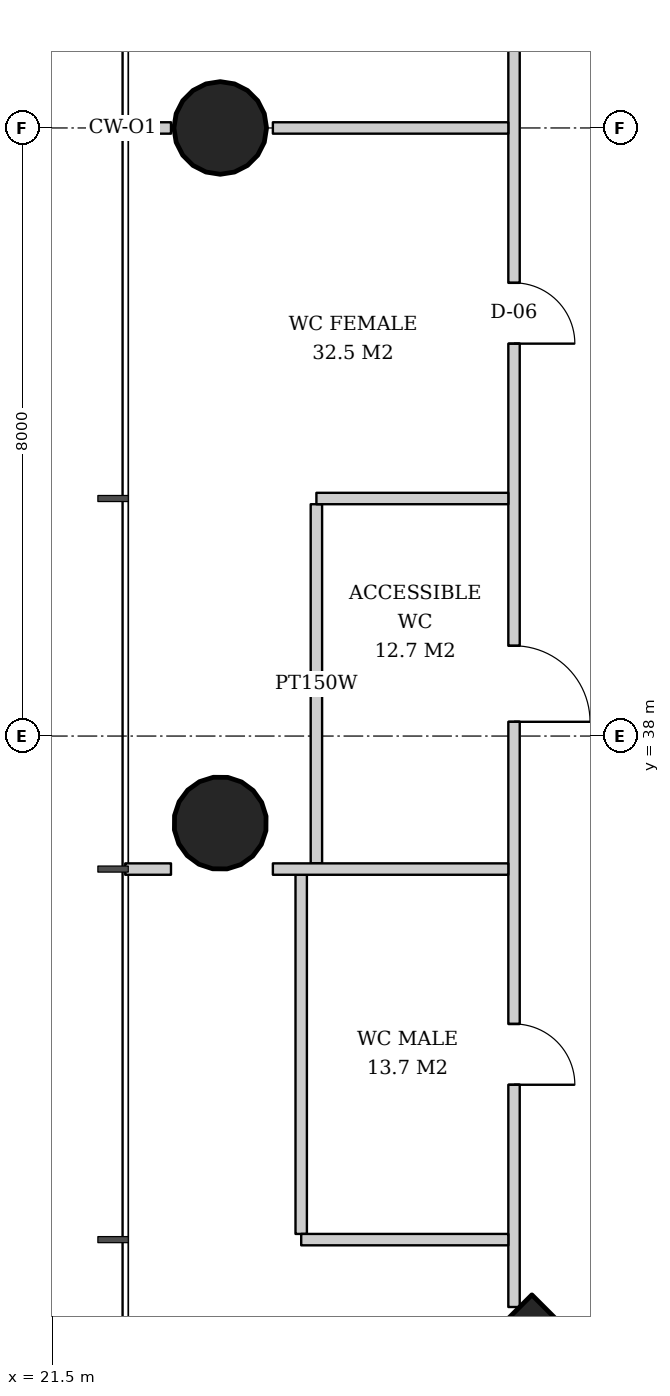
"""IFC4 building model, lengths in metres.
Left out: names, types, materials, properties, quantities, classifications, styles, units other than length and angle.
Written with IfcOpenShell. Run it as: python <this file> out.ifc"""

import sys

from ifc_helpers import new_model, si_unit, direction, frame, frame_2d, origin, origin_2d, place, context, subcontext, project, spatial, rectangle, hollow_circle, extrude, element, fill, save


model = new_model("IFC4")
c1 = context("Model", 3, precision=1e-05, world=origin(), true_north=direction((0.0, 1.0)))
c2 = subcontext(c1, "Body", "Model", "MODEL_VIEW")
j1 = project(units=[si_unit("LENGTHUNIT", "METRE"), si_unit("PLANEANGLEUNIT", "RADIAN")], contexts=[c1])
p1 = place(None, origin())
s1 = spatial("IfcSite", under=j1, at=p1, CompositionType="ELEMENT")
p2 = place(p1, origin())
s2 = spatial("IfcBuilding", under=s1, at=p2, CompositionType="ELEMENT")
p3 = place(p2, frame((0.0, 0.0, 104.6)))
s3 = spatial("IfcBuildingStorey", under=s2, at=p3, CompositionType="ELEMENT", Elevation=104.6)
p4 = place(p3, frame((27.771, 28.771, 0.0), z_axis=(0.031900153262, 0.031900153262, 0.998981861919), x_axis=(-0.707106781187, 0.707106781187, 0.0)))
e1 = element("IfcColumn", 1, at=p4, inside=s3, PredefinedType="COLUMN", context=c2, shape_type="SweptSolid", body=[
    extrude(rectangle(XDim=2.6, YDim=2.6, at=origin_2d()), origin(), (0.0, 0.0, 1.0), 3.804),
])
p5 = place(p3, frame((23.671, 46.0, 0.0), z_axis=(0.031980549263, 0.0, 0.999488491414), x_axis=(0.0, 1.0, 0.0)))
e2 = element("IfcColumn", 2, at=p5, inside=s3, PredefinedType="COLUMN", context=c2, shape_type="SweptSolid", body=[
    extrude(hollow_circle(Radius=0.61, WallThickness=0.04, at=origin_2d()), origin(), (0.0, 0.0, 1.0), 3.802),
])
p6 = place(p3, frame((23.671, 36.836, 0.0), z_axis=(0.031976461511, 0.015988230756, 0.999360736865), x_axis=(-0.4472135955, 0.894427191, 0.0)))
e3 = element("IfcColumn", 3, at=p6, inside=s3, PredefinedType="COLUMN", context=c2, shape_type="SweptSolid", body=[
    extrude(hollow_circle(Radius=0.61, WallThickness=0.04, at=origin_2d()), origin(), (0.0, 0.0, 1.0), 3.802),
])
p7 = place(p3, frame((24.975, 41.05, 0.0), z_axis=(0.0, 0.0, 1.0), x_axis=(0.0, -1.0, 0.0)))
e4 = element("IfcWall", 4, at=p7, inside=s3, PredefinedType="PARTITIONING", context=c2, shape_type="SweptSolid", body=[
    extrude(rectangle(XDim=4.725, YDim=0.15, at=frame_2d((2.363, 0.0))), origin(), (0.0, 0.0, 1.0), 2.806),
])
p8 = place(p3, frame((24.775, 36.175, 0.0), z_axis=(0.0, 0.0, 1.0), x_axis=(0.0, -1.0, 0.0)))
e5 = element("IfcWall", 5, at=p8, inside=s3, PredefinedType="PARTITIONING", context=c2, shape_type="SweptSolid", body=[
    extrude(rectangle(XDim=4.725, YDim=0.15, at=frame_2d((2.363, 0.0))), origin(), (0.0, 0.0, 1.0), 3.62),
])
p9 = place(p3, frame((27.575, 61.511, 0.0), z_axis=(0.0, 0.0, 1.0), x_axis=(0.0, -1.0, 0.0)))
e6 = element("IfcWall", 6, at=p9, inside=s3, PredefinedType="PARTITIONING", context=c2, shape_type="SweptSolid", body=[
    extrude(rectangle(XDim=31.023, YDim=0.15, at=frame_2d((15.511, 0.0))), origin(), (0.0, 0.0, 1.0), 2.72),
])
p10 = place(p9, frame((2.824, 0.0, 0.0)))
e7 = element("IfcOpeningElement", 7, at=p10, cuts=e6, PredefinedType="OPENING", context=c2, shape_type="SweptSolid", body=[
    extrude(rectangle(XDim=1.0, YDim=2.1, at=frame_2d((0.5, 1.05))), frame((0.0, 0.085, 0.0), z_axis=(0.0, -1.0, 0.0), x_axis=(1.0, 0.0, 0.0)), (0.0, 0.0, 1.0), 0.17),
])
p11 = place(p9, frame((7.699, 0.0, 0.0)))
e8 = element("IfcOpeningElement", 8, at=p11, cuts=e6, PredefinedType="OPENING", context=c2, shape_type="SweptSolid", body=[
    extrude(rectangle(XDim=1.0, YDim=2.1, at=frame_2d((0.5, 1.05))), frame((0.0, 0.085, 0.0), z_axis=(0.0, -1.0, 0.0), x_axis=(1.0, 0.0, 0.0)), (0.0, 0.0, 1.0), 0.17),
])
p12 = place(p9, frame((12.574, 0.0, 0.0)))
e9 = element("IfcOpeningElement", 9, at=p12, cuts=e6, PredefinedType="OPENING", context=c2, shape_type="SweptSolid", body=[
    extrude(rectangle(XDim=1.0, YDim=2.1, at=frame_2d((0.5, 1.05))), frame((0.0, 0.085, 0.0), z_axis=(0.0, -1.0, 0.0), x_axis=(1.0, 0.0, 0.0)), (0.0, 0.0, 1.0), 0.17),
])
p13 = place(p9, frame((17.549, 0.0, 0.0)))
e10 = element("IfcOpeningElement", 10, at=p13, cuts=e6, PredefinedType="OPENING", context=c2, shape_type="SweptSolid", body=[
    extrude(rectangle(XDim=0.8, YDim=2.1, at=frame_2d((0.4, 1.05))), frame((0.0, 0.085, 0.0), z_axis=(0.0, -1.0, 0.0), x_axis=(1.0, 0.0, 0.0)), (0.0, 0.0, 1.0), 0.17),
])
p14 = place(p9, frame((22.324, 0.0, 0.0)))
e11 = element("IfcOpeningElement", 11, at=p14, cuts=e6, PredefinedType="OPENING", context=c2, shape_type="SweptSolid", body=[
    extrude(rectangle(XDim=1.0, YDim=2.1, at=frame_2d((0.5, 1.05))), frame((0.0, 0.085, 0.0), z_axis=(0.0, -1.0, 0.0), x_axis=(1.0, 0.0, 0.0)), (0.0, 0.0, 1.0), 0.17),
])
p15 = place(p9, frame((27.299, 0.0, 0.0)))
e12 = element("IfcOpeningElement", 12, at=p15, cuts=e6, PredefinedType="OPENING", context=c2, shape_type="SweptSolid", body=[
    extrude(rectangle(XDim=0.8, YDim=2.1, at=frame_2d((0.4, 1.05))), frame((0.0, 0.085, 0.0), z_axis=(0.0, -1.0, 0.0), x_axis=(1.0, 0.0, 0.0)), (0.0, 0.0, 1.0), 0.17),
])
p16 = place(p3, frame((27.5, 46.0, 0.0), z_axis=(0.0, 0.0, 1.0), x_axis=(-1.0, 0.0, 0.0)))
e13 = element("IfcWall", 13, at=p16, inside=s3, PredefinedType="PARTITIONING", context=c2, shape_type="SweptSolid", body=[
    extrude(rectangle(XDim=3.098, YDim=0.15, at=frame_2d((1.549, 0.0))), origin(), (0.0, 0.0, 1.0), 2.858),
])
p17 = place(p3, frame((23.062, 46.0, 0.0), z_axis=(0.0, 0.0, 1.0), x_axis=(-1.0, 0.0, 0.0)))
e14 = element("IfcWall", 14, at=p17, inside=s3, PredefinedType="PARTITIONING", context=c2, shape_type="SweptSolid", body=[
    extrude(rectangle(XDim=0.602, YDim=0.15, at=frame_2d((0.301, 0.0))), origin(), (0.0, 0.0, 1.0), 3.62),
])
p18 = place(p3, frame((27.5, 41.125, 0.0), z_axis=(0.0, 0.0, 1.0), x_axis=(-1.0, 0.0, 0.0)))
e15 = element("IfcWall", 15, at=p18, inside=s3, PredefinedType="PARTITIONING", context=c2, shape_type="SweptSolid", body=[
    extrude(rectangle(XDim=2.525, YDim=0.15, at=frame_2d((1.262, 0.0))), origin(), (0.0, 0.0, 1.0), 3.62),
])
p19 = place(p3, frame((27.5, 36.25, 0.0), z_axis=(0.0, 0.0, 1.0), x_axis=(-1.0, 0.0, 0.0)))
e16 = element("IfcWall", 16, at=p19, inside=s3, PredefinedType="PARTITIONING", context=c2, shape_type="SweptSolid", body=[
    extrude(rectangle(XDim=3.098, YDim=0.15, at=frame_2d((1.549, 0.0))), origin(), (0.0, 0.0, 1.0), 3.62),
])
p20 = place(p3, frame((23.062, 36.25, 0.0), z_axis=(0.0, 0.0, 1.0), x_axis=(-1.0, 0.0, 0.0)))
e17 = element("IfcWall", 17, at=p20, inside=s3, PredefinedType="PARTITIONING", context=c2, shape_type="SweptSolid", body=[
    extrude(rectangle(XDim=0.602, YDim=0.15, at=frame_2d((0.301, 0.0))), origin(), (0.0, 0.0, 1.0), 3.62),
])
p21 = place(p3, frame((27.5, 31.375, 0.0), z_axis=(0.0, 0.0, 1.0), x_axis=(-1.0, 0.0, 0.0)))
e18 = element("IfcWall", 18, at=p21, inside=s3, PredefinedType="PARTITIONING", context=c2, shape_type="SweptSolid", body=[
    extrude(rectangle(XDim=2.725, YDim=0.15, at=frame_2d((1.363, 0.0))), origin(), (0.0, 0.0, 1.0), 3.62),
])
p22 = place(p13, origin())
e19 = element("IfcDoor", 19, at=p22, inside=s3, OperationType="SINGLE_SWING_RIGHT", PredefinedType="DOOR", context=c2, shape_type="SweptSolid", body=[
    extrude(rectangle(XDim=0.8, YDim=2.1, at=frame_2d((0.4, 1.05))), frame((0.0, 0.025, 0.0), z_axis=(0.0, -1.0, 0.0), x_axis=(1.0, 0.0, 0.0)), (0.0, 0.0, 1.0), 0.05),
])
fill(e10, e19)
p23 = place(p14, origin())
e20 = element("IfcDoor", 20, at=p23, inside=s3, OperationType="SINGLE_SWING_RIGHT", PredefinedType="DOOR", context=c2, shape_type="SweptSolid", body=[
    extrude(rectangle(XDim=1.0, YDim=2.1, at=frame_2d((0.5, 1.05))), frame((0.0, 0.025, 0.0), z_axis=(0.0, -1.0, 0.0), x_axis=(1.0, 0.0, 0.0)), (0.0, 0.0, 1.0), 0.05),
])
fill(e11, e20)
p24 = place(p15, origin())
e21 = element("IfcDoor", 21, at=p24, inside=s3, OperationType="SINGLE_SWING_RIGHT", PredefinedType="DOOR", context=c2, shape_type="SweptSolid", body=[
    extrude(rectangle(XDim=0.8, YDim=2.1, at=frame_2d((0.4, 1.05))), frame((0.0, 0.025, 0.0), z_axis=(0.0, -1.0, 0.0), x_axis=(1.0, 0.0, 0.0)), (0.0, 0.0, 1.0), 0.05),
])
fill(e12, e21)
save(model, sys.argv[1])
